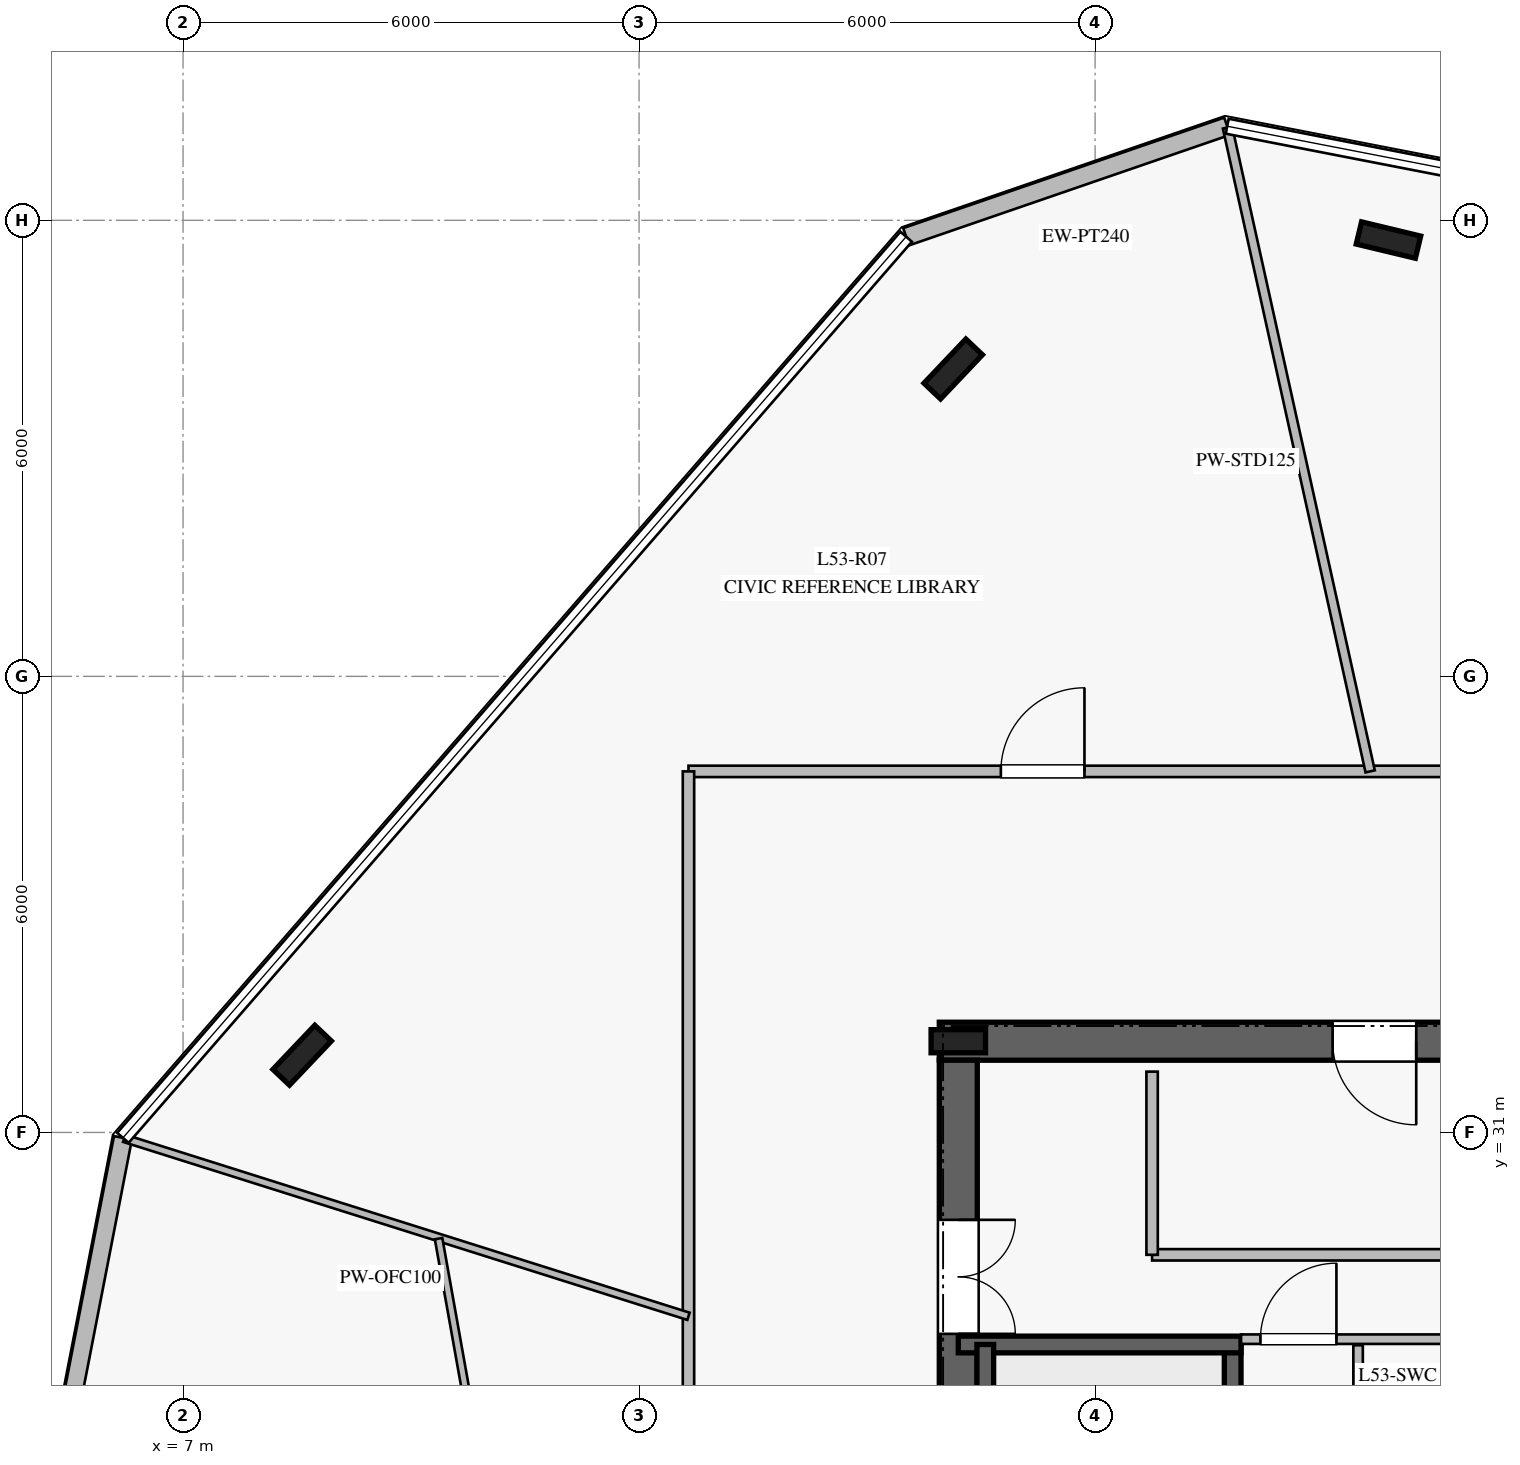
"""IFC4 building model, lengths in metres.
Left out: names, types, materials, properties, quantities, classifications, styles, units other than length and angle.
Written with IfcOpenShell. Run it as: python <this file> out.ifc"""

import sys

from ifc_helpers import new_model, si_unit, direction, frame, frame_2d, origin, origin_2d, place, context, subcontext, project, spatial, rectangle, i_section, extrude, element, fill, save


model = new_model("IFC4")
c1 = context("Model", 3, precision=1e-05, world=origin(), true_north=direction((0.0, 1.0)))
c2 = subcontext(c1, "Body", "Model", "MODEL_VIEW")
j1 = project(units=[si_unit("LENGTHUNIT", "METRE"), si_unit("PLANEANGLEUNIT", "RADIAN")], contexts=[c1])
p1 = place(None, origin())
s1 = spatial("IfcSite", under=j1, at=p1, CompositionType="ELEMENT")
p2 = place(p1, origin())
s2 = spatial("IfcBuilding", under=s1, at=p2, CompositionType="ELEMENT")
p3 = place(p2, frame((0.0, 0.0, 220.8)))
s3 = spatial("IfcBuildingStorey", under=s2, at=p3, CompositionType="ELEMENT", Elevation=220.8)
p4 = place(p3, frame((33.05, 32.2, 0.0), z_axis=(0.0, 0.0, 1.0), x_axis=(-1.0, 0.0, 0.0)))
e1 = element("IfcWall", 1, at=p4, inside=s3, PredefinedType="SHEAR", context=c2, shape_type="SweptSolid", body=[
    extrude(rectangle(XDim=16.1, YDim=0.5, at=frame_2d((8.05, 0.0))), origin(), (0.0, 0.0, 1.0), 3.78),
])
p5 = place(p4, frame((5.0, 0.0, 0.0)))
e2 = element("IfcOpeningElement", 2, at=p5, cuts=e1, PredefinedType="OPENING", context=c2, shape_type="SweptSolid", body=[
    extrude(rectangle(XDim=1.2, YDim=2.25, at=frame_2d((0.6, 1.125))), frame((0.0, 0.26, 0.0), z_axis=(0.0, -1.0, 0.0), x_axis=(1.0, 0.0, 0.0)), (0.0, 0.0, 1.0), 0.52),
])
p6 = place(p4, frame((9.825, 0.0, 0.0)))
e3 = element("IfcOpeningElement", 3, at=p6, cuts=e1, PredefinedType="OPENING", context=c2, shape_type="SweptSolid", body=[
    extrude(rectangle(XDim=1.1, YDim=2.2, at=frame_2d((0.55, 1.1))), frame((0.0, 0.26, 0.0), z_axis=(0.0, -1.0, 0.0), x_axis=(1.0, 0.0, 0.0)), (0.0, 0.0, 1.0), 0.52),
])
p7 = place(p3, frame((17.2, 31.95, 0.0), z_axis=(0.0, 0.0, 1.0), x_axis=(0.0, -1.0, 0.0)))
e4 = element("IfcWall", 4, at=p7, inside=s3, PredefinedType="SHEAR", context=c2, shape_type="SweptSolid", body=[
    extrude(rectangle(XDim=13.9, YDim=0.5, at=frame_2d((6.95, 0.0))), origin(), (0.0, 0.0, 1.0), 3.78),
])
p8 = place(p7, frame((2.1, 0.0, 0.0)))
e5 = element("IfcOpeningElement", 5, at=p8, cuts=e4, PredefinedType="OPENING", context=c2, shape_type="SweptSolid", body=[
    extrude(rectangle(XDim=1.5, YDim=2.2, at=frame_2d((0.75, 1.1))), frame((0.0, 0.26, 0.0), z_axis=(0.0, -1.0, 0.0), x_axis=(1.0, 0.0, 0.0)), (0.0, 0.0, 1.0), 0.52),
])
p9 = place(p3, frame((17.2, 32.2, 0.0), z_axis=(0.0, 0.0, 1.0), x_axis=(1.0, 0.0, 0.0)))
e6 = element("IfcColumn", 6, at=p9, inside=s3, PredefinedType="COLUMN", context=c2, shape_type="SweptSolid", body=[
    extrude(i_section(OverallWidth=0.304, OverallDepth=0.716, WebThickness=0.021, FlangeThickness=0.04, at=origin_2d()), origin(), (0.0, 0.0, 1.0), 4.0),
])
p10 = place(p3, frame((20.81, 20.99, 0.0), z_axis=(0.0, 0.0, 1.0), x_axis=(0.0, 1.0, 0.0)))
e7 = element("IfcWall", 7, at=p10, inside=s3, PredefinedType="SOLIDWALL", context=c2, shape_type="SweptSolid", body=[
    extrude(rectangle(XDim=7.22, YDim=0.22, at=frame_2d((3.61, 0.0))), origin(), (0.0, 0.0, 1.0), 3.78),
])
p11 = place(p10, frame((0.18, 0.0, 0.0)))
e8 = element("IfcOpeningElement", 8, at=p11, cuts=e7, PredefinedType="OPENING", context=c2, shape_type="SweptSolid", body=[
    extrude(rectangle(XDim=1.15, YDim=2.2, at=frame_2d((0.575, 1.1))), frame((0.0, 0.12, 0.0), z_axis=(0.0, -1.0, 0.0), x_axis=(1.0, 0.0, 0.0)), (0.0, 0.0, 1.0), 0.24),
])
p12 = place(p3, frame((17.2, 28.21, 0.0), z_axis=(0.0, 0.0, 1.0), x_axis=(1.0, 0.0, 0.0)))
e9 = element("IfcWall", 9, at=p12, inside=s3, PredefinedType="SOLIDWALL", context=c2, shape_type="SweptSolid", body=[
    extrude(rectangle(XDim=3.72, YDim=0.22, at=frame_2d((1.86, 0.0))), origin(), (0.0, 0.0, 1.0), 3.78),
])
p13 = place(p3, frame((17.555, 28.21, 0.0), z_axis=(0.0, 0.0, 1.0), x_axis=(0.0, -1.0, 0.0)))
e10 = element("IfcWall", 10, at=p13, inside=s3, PredefinedType="SOLIDWALL", context=c2, shape_type="SweptSolid", body=[
    extrude(rectangle(XDim=7.22, YDim=0.22, at=frame_2d((3.61, 0.0))), origin(), (0.0, 0.0, 1.0), 3.78),
])
for number, where, z_axis, x_axis in (
    (11, (22.86, 42.74, 0.0), (0.0, 0.0, 1.0), (-0.972, 0.233, 0.0)),
    (12, (17.133, 41.044, 0.0), (0.0, 0.0, 1.0), (0.688, 0.725, 0.0)),
    (13, (8.567, 32.016, 0.0), (0.0, 0.0, 1.0), (0.688, 0.725, 0.0)),
):
    element("IfcColumn", number, at=place(p3, frame(where, z_axis=z_axis, x_axis=x_axis)), inside=s3, PredefinedType="COLUMN", context=c2, shape_type="SweptSolid", body=[
        extrude(i_section(OverallWidth=0.3, OverallDepth=0.8, WebThickness=0.018, FlangeThickness=0.033, at=origin_2d()), origin(), (0.0, 0.0, 1.0), 4.0),
    ])
p14 = place(p3, frame((20.738, 44.238, 0.0), z_axis=(0.0, 0.0, 1.0), x_axis=(-0.94554475493, -0.325492114227, 0.0)))
e14 = element("IfcWall", 14, at=p14, inside=s3, PredefinedType="STANDARD", context=c2, shape_type="SweptSolid", body=[
    extrude(rectangle(XDim=4.467, YDim=0.24, at=frame_2d((2.234, 0.0))), origin(), (0.0, 0.0, 1.0), 3.78),
])
p15 = place(p3, frame((6.209, 30.929, 0.0), z_axis=(0.0, 0.0, 1.0), x_axis=(-0.190871121271, -0.981615105357, 0.0)))
e15 = element("IfcWall", 15, at=p15, inside=s3, PredefinedType="STANDARD", context=c2, shape_type="SweptSolid", body=[
    extrude(rectangle(XDim=4.469, YDim=0.24, at=frame_2d((2.235, 0.0))), origin(), (0.0, 0.0, 1.0), 3.78),
])
p16 = place(p3, frame((20.92, 28.28, 0.0), z_axis=(0.0, 0.0, 1.0), x_axis=(1.0, 0.0, 0.0)))
e16 = element("IfcWall", 16, at=p16, inside=s3, PredefinedType="PARTITIONING", context=c2, shape_type="SweptSolid", body=[
    extrude(rectangle(XDim=3.405, YDim=0.125, at=frame_2d((1.703, 0.0))), origin(), (0.0, 0.0, 1.0), 3.78),
])
p17 = place(p16, frame((0.255, 0.0, 0.0)))
e17 = element("IfcOpeningElement", 17, at=p17, cuts=e16, PredefinedType="OPENING", context=c2, shape_type="SweptSolid", body=[
    extrude(rectangle(XDim=1.0, YDim=2.15, at=frame_2d((0.5, 1.075))), frame((0.0, 0.073, 0.0), z_axis=(0.0, -1.0, 0.0), x_axis=(1.0, 0.0, 0.0)), (0.0, 0.0, 1.0), 0.145),
])
p18 = place(p3, frame((22.46, 25.62, 0.0), z_axis=(0.0, 0.0, 1.0), x_axis=(0.0, 1.0, 0.0)))
e18 = element("IfcWall", 18, at=p18, inside=s3, PredefinedType="PARTITIONING", context=c2, shape_type="SweptSolid", body=[
    extrude(rectangle(XDim=2.58, YDim=0.125, at=frame_2d((1.29, 0.0))), origin(), (0.0, 0.0, 1.0), 3.78),
])
p19 = place(p3, frame((19.75, 29.39, 0.0), z_axis=(0.0, 0.0, 1.0), x_axis=(1.0, 0.0, 0.0)))
e19 = element("IfcWall", 19, at=p19, inside=s3, PredefinedType="PARTITIONING", context=c2, shape_type="SweptSolid", body=[
    extrude(rectangle(XDim=5.9, YDim=0.15, at=frame_2d((2.95, 0.0))), origin(), (0.0, 0.0, 1.0), 3.78),
])
p20 = place(p3, frame((19.75, 29.39, 0.0), z_axis=(0.0, 0.0, 1.0), x_axis=(0.0, 1.0, 0.0)))
e20 = element("IfcWall", 20, at=p20, inside=s3, PredefinedType="PARTITIONING", context=c2, shape_type="SweptSolid", body=[
    extrude(rectangle(XDim=2.41, YDim=0.15, at=frame_2d((1.205, 0.0))), origin(), (0.0, 0.0, 1.0), 3.78),
])
p21 = place(p3, frame((13.65, 35.75, 0.0), z_axis=(0.0, 0.0, 1.0), x_axis=(1.0, 0.0, 0.0)))
e21 = element("IfcWall", 21, at=p21, inside=s3, PredefinedType="PARTITIONING", context=c2, shape_type="SweptSolid", body=[
    extrude(rectangle(XDim=22.7, YDim=0.15, at=frame_2d((11.35, 0.0))), origin(), (0.0, 0.0, 1.0), 3.02),
])
p22 = place(p21, frame((15.005, 0.0, 0.0)))
e22 = element("IfcOpeningElement", 22, at=p22, cuts=e21, PredefinedType="OPENING", context=c2, shape_type="SweptSolid", body=[
    extrude(rectangle(XDim=1.1, YDim=2.2, at=frame_2d((0.55, 1.1))), frame((0.0, 0.085, 0.0), z_axis=(0.0, -1.0, 0.0), x_axis=(1.0, 0.0, 0.0)), (0.0, 0.0, 1.0), 0.17),
])
p23 = place(p21, frame((4.11, 0.0, 0.0)))
e23 = element("IfcOpeningElement", 23, at=p23, cuts=e21, PredefinedType="OPENING", context=c2, shape_type="SweptSolid", body=[
    extrude(rectangle(XDim=1.1, YDim=2.2, at=frame_2d((0.55, 1.1))), frame((0.0, 0.085, 0.0), z_axis=(0.0, -1.0, 0.0), x_axis=(1.0, 0.0, 0.0)), (0.0, 0.0, 1.0), 0.17),
])
p24 = place(p3, frame((13.65, 14.25, 0.0), z_axis=(0.0, 0.0, 1.0), x_axis=(0.0, 1.0, 0.0)))
e24 = element("IfcWall", 24, at=p24, inside=s3, PredefinedType="PARTITIONING", context=c2, shape_type="SweptSolid", body=[
    extrude(rectangle(XDim=21.5, YDim=0.15, at=frame_2d((10.75, 0.0))), origin(), (0.0, 0.0, 1.0), 3.05),
])
p25 = place(p24, frame((8.443, 0.0, 0.0)))
e25 = element("IfcOpeningElement", 25, at=p25, cuts=e24, PredefinedType="OPENING", context=c2, shape_type="SweptSolid", body=[
    extrude(rectangle(XDim=1.1, YDim=2.2, at=frame_2d((0.55, 1.1))), frame((0.0, 0.085, 0.0), z_axis=(0.0, -1.0, 0.0), x_axis=(1.0, 0.0, 0.0)), (0.0, 0.0, 1.0), 0.17),
])
p26 = place(p3, frame((22.619, 35.75, 0.0), z_axis=(0.0, 0.0, 1.0), x_axis=(-0.2163285843, 0.976320615174, 0.0)))
e26 = element("IfcWall", 26, at=p26, inside=s3, PredefinedType="PARTITIONING", context=c2, shape_type="SweptSolid", body=[
    extrude(rectangle(XDim=8.677, YDim=0.125, at=frame_2d((4.338, 0.0))), origin(), (0.0, 0.0, 1.0), 3.02),
])
p27 = place(p3, frame((13.65, 28.581, 0.0), z_axis=(0.0, 0.0, 1.0), x_axis=(-0.953668418843, 0.300859679754, 0.0)))
e27 = element("IfcWall", 27, at=p27, inside=s3, PredefinedType="MOVABLE", context=c2, shape_type="SweptSolid", body=[
    extrude(rectangle(XDim=7.784, YDim=0.1, at=frame_2d((3.892, 0.0))), origin(), (0.0, 0.0, 1.0), 3.18),
])
p28 = place(p3, frame((10.362, 29.603, 0.0), z_axis=(0.0, 0.0, 1.0), x_axis=(0.175922734222, -0.984403977838, 0.0)))
e28 = element("IfcWall", 28, at=p28, inside=s3, PredefinedType="MOVABLE", context=c2, shape_type="SweptSolid", body=[
    extrude(rectangle(XDim=12.346, YDim=0.1, at=frame_2d((6.173, 0.0))), origin(), (0.0, 0.0, 1.0), 3.25),
])
p29 = place(p28, frame((5.673, 0.0, 0.0)))
e29 = element("IfcOpeningElement", 29, at=p29, cuts=e28, PredefinedType="OPENING", context=c2, shape_type="SweptSolid", body=[
    extrude(rectangle(XDim=1.0, YDim=2.15, at=frame_2d((0.5, 1.075))), frame((0.0, 0.06, 0.0), z_axis=(0.0, -1.0, 0.0), x_axis=(1.0, 0.0, 0.0)), (0.0, 0.0, 1.0), 0.12),
])
p30 = place(p8, origin())
e30 = element("IfcDoor", 30, at=p30, inside=s3, OperationType="DOUBLE_DOOR_SINGLE_SWING", PredefinedType="DOOR", context=c2, shape_type="SweptSolid", body=[
    extrude(rectangle(XDim=1.5, YDim=2.2, at=frame_2d((0.75, 1.1))), frame((0.0, 0.025, 0.0), z_axis=(0.0, -1.0, 0.0), x_axis=(1.0, 0.0, 0.0)), (0.0, 0.0, 1.0), 0.05),
])
fill(e5, e30)
p31 = place(p17, origin())
e31 = element("IfcDoor", 31, at=p31, inside=s3, OperationType="SINGLE_SWING_RIGHT", PredefinedType="DOOR", context=c2, shape_type="SweptSolid", body=[
    extrude(rectangle(XDim=1.0, YDim=2.15, at=frame_2d((0.5, 1.075))), frame((0.0, 0.025, 0.0), z_axis=(0.0, -1.0, 0.0), x_axis=(1.0, 0.0, 0.0)), (0.0, 0.0, 1.0), 0.05),
])
fill(e17, e31)
p32 = place(p6, origin())
e32 = element("IfcDoor", 32, at=p32, inside=s3, OperationType="SINGLE_SWING_LEFT", PredefinedType="DOOR", context=c2, shape_type="SweptSolid", body=[
    extrude(rectangle(XDim=1.1, YDim=2.2, at=frame_2d((0.55, 1.1))), frame((0.0, 0.025, 0.0), z_axis=(0.0, -1.0, 0.0), x_axis=(1.0, 0.0, 0.0)), (0.0, 0.0, 1.0), 0.05),
])
fill(e3, e32)
p33 = place(p23, origin())
e33 = element("IfcDoor", 33, at=p33, inside=s3, OperationType="SINGLE_SWING_RIGHT", PredefinedType="DOOR", context=c2, shape_type="SweptSolid", body=[
    extrude(rectangle(XDim=1.1, YDim=2.2, at=frame_2d((0.55, 1.1))), frame((0.0, 0.025, 0.0), z_axis=(0.0, -1.0, 0.0), x_axis=(1.0, 0.0, 0.0)), (0.0, 0.0, 1.0), 0.05),
])
fill(e23, e33)
save(model, sys.argv[1])
